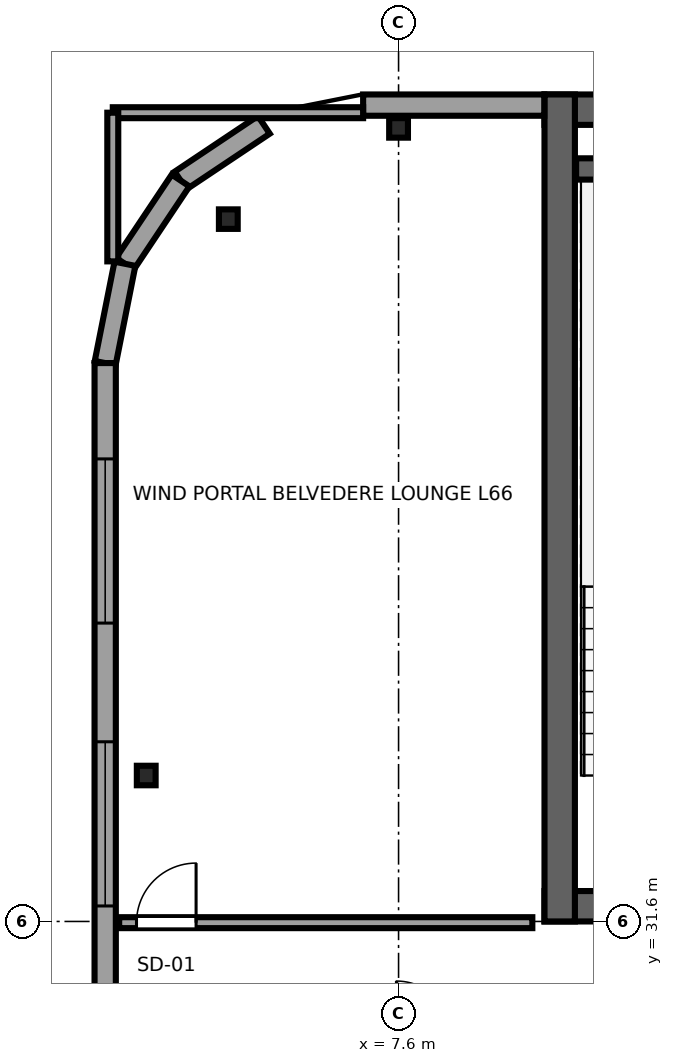
"""IFC4 building model, lengths in metres.
Left out: names, types, materials, properties, quantities, classifications, styles, units other than length and angle.
Written with IfcOpenShell. Run it as: python <this file> out.ifc"""

import sys

from ifc_helpers import new_model, si_unit, direction, frame, frame_2d, origin, origin_2d, place, context, subcontext, project, spatial, rectangle, i_section, extrude, source, transform, mapped, element, fill, save


model = new_model("IFC4")
c1 = context("Model", 3, precision=1e-05, world=origin(), true_north=direction((0.0, 1.0)))
c2 = subcontext(c1, "Body", "Model", "MODEL_VIEW")
j1 = project(units=[si_unit("LENGTHUNIT", "METRE"), si_unit("PLANEANGLEUNIT", "RADIAN")], contexts=[c1])
p1 = place(None, origin())
s1 = spatial("IfcSite", under=j1, at=p1, CompositionType="ELEMENT")
p2 = place(p1, origin())
s2 = spatial("IfcBuilding", under=s1, at=p2, CompositionType="ELEMENT")
p3 = place(p2, frame((0.0, 0.0, 248.75)))
s3 = spatial("IfcBuildingStorey", under=s2, at=p3, CompositionType="ELEMENT", Elevation=248.75)
p4 = place(p3, frame((10.0, 31.85, 0.0), z_axis=(0.0, 0.0, 1.0), x_axis=(1.0, 0.0, 0.0)))
e1 = element("IfcWall", 1, at=p4, inside=s3, PredefinedType="SHEAR", context=c2, shape_type="SweptSolid", body=[
    extrude(rectangle(XDim=26.0, YDim=0.5, at=frame_2d((13.0, 0.0))), origin(), (0.0, 0.0, 1.0), 3.55),
])
p5 = place(p4, frame((7.45, 0.0, 0.0), z_axis=(0.0, 0.0, 1.0), x_axis=(-1.0, 0.0, 0.0)))
e2 = element("IfcOpeningElement", 2, at=p5, cuts=e1, PredefinedType="OPENING", context=c2, shape_type="SweptSolid", body=[
    extrude(rectangle(XDim=1.5, YDim=2.04, at=frame_2d((0.75, 1.02))), frame((0.0, 0.26, 0.0), z_axis=(0.0, -1.0, 0.0), x_axis=(1.0, 0.0, 0.0)), (0.0, 0.0, 1.0), 0.52),
])
p6 = place(p4, frame((13.75, 0.0, 0.0), z_axis=(0.0, 0.0, 1.0), x_axis=(-1.0, 0.0, 0.0)))
e3 = element("IfcOpeningElement", 3, at=p6, cuts=e1, PredefinedType="OPENING", context=c2, shape_type="SweptSolid", body=[
    extrude(rectangle(XDim=1.5, YDim=2.04, at=frame_2d((0.75, 1.02))), frame((0.0, 0.26, 0.0), z_axis=(0.0, -1.0, 0.0), x_axis=(1.0, 0.0, 0.0)), (0.0, 0.0, 1.0), 0.52),
])
p7 = place(p4, frame((20.05, 0.0, 0.0), z_axis=(0.0, 0.0, 1.0), x_axis=(-1.0, 0.0, 0.0)))
e4 = element("IfcOpeningElement", 4, at=p7, cuts=e1, PredefinedType="OPENING", context=c2, shape_type="SweptSolid", body=[
    extrude(rectangle(XDim=1.5, YDim=2.04, at=frame_2d((0.75, 1.02))), frame((0.0, 0.26, 0.0), z_axis=(0.0, -1.0, 0.0), x_axis=(1.0, 0.0, 0.0)), (0.0, 0.0, 1.0), 0.52),
])
p8 = place(p3, frame((10.0, 44.95, 0.0), z_axis=(0.0, 0.0, 1.0), x_axis=(1.0, 0.0, 0.0)))
e5 = element("IfcWall", 5, at=p8, inside=s3, PredefinedType="SHEAR", context=c2, shape_type="SweptSolid", body=[
    extrude(rectangle(XDim=26.0, YDim=0.5, at=frame_2d((13.0, 0.0))), origin(), (0.0, 0.0, 1.0), 3.55),
])
p9 = place(p3, frame((10.25, 31.6, 0.0), z_axis=(0.0, 0.0, 1.0), x_axis=(0.0, 1.0, 0.0)))
e6 = element("IfcWall", 6, at=p9, inside=s3, PredefinedType="SHEAR", context=c2, shape_type="SweptSolid", body=[
    extrude(rectangle(XDim=13.6, YDim=0.5, at=frame_2d((6.8, 0.0))), origin(), (0.0, 0.0, 1.0), 3.55),
])
p10 = place(p3, frame((10.52, 43.975, 0.0), z_axis=(0.0, 0.0, 1.0), x_axis=(1.0, 0.0, 0.0)))
e7 = element("IfcWall", 7, at=p10, inside=s3, PredefinedType="SHEAR", context=c2, shape_type="SweptSolid", body=[
    extrude(rectangle(XDim=3.6, YDim=0.35, at=frame_2d((1.8, 0.0))), origin(), (0.0, 0.0, 1.0), 3.55),
])
m1 = source(origin(), c2, "Body", "SweptSolid", [
    extrude(i_section(OverallWidth=0.309, OverallDepth=0.321, WebThickness=0.014, FlangeThickness=0.022, FilletRadius=0.017, at=origin_2d()), origin(), (0.0, 0.0, 1.0), 3.55),
])
for number, where, z_axis, x_axis in (
    (8, (4.8, 43.15, 0.0), (0.0, 0.0, 1.0), (1.0, 0.0, 0.0)),
    (9, (7.6, 44.65, 0.0), (0.0, 0.0, 1.0), (1.0, 0.0, 0.0)),
    (10, (3.45, 34.0, 0.0), (0.0, 0.0, 1.0), (1.0, 0.0, 0.0)),
):
    element("IfcColumn", number, at=place(p3, frame(where, z_axis=z_axis, x_axis=x_axis)), inside=s3, PredefinedType="COLUMN", context=c2, shape_type="MappedRepresentation", body=[
        mapped(m1, transform((0.0, 0.0, 0.0), x_axis=(1.0, 0.0, 0.0), y_axis=(0.0, 1.0, 0.0), z_axis=(0.0, 0.0, 1.0), scale=1.0)),
    ])
p11 = place(p3, frame((9.996, 45.025, 0.0), z_axis=(0.0, 0.0, 1.0), x_axis=(-1.0, 0.0, 0.0)))
e11 = element("IfcWall", 11, at=p11, inside=s3, PredefinedType="SOLIDWALL", context=c2, shape_type="SweptSolid", body=[
    extrude(rectangle(XDim=2.979, YDim=0.35, at=frame_2d((1.49, 0.0))), origin(), (0.0, 0.0, 1.0), 2.16),
])
for number, where, z_axis, x_axis in (
    (12, (5.385, 44.7, 0.0), (0.0, 0.0, 1.0), (-0.832, -0.556, 0.0)),
    (13, (4.015, 43.785, 0.0), (0.0, 0.0, 1.0), (-0.556, -0.831, 0.0)),
):
    element("IfcWall", number, at=place(p3, frame(where, z_axis=z_axis, x_axis=x_axis)), inside=s3, PredefinedType="SOLIDWALL", context=c2, shape_type="SweptSolid", body=[
        extrude(rectangle(XDim=1.647, YDim=0.35, at=frame_2d((0.824, 0.0))), origin(), (0.0, 0.0, 1.0), 2.9),
    ])
p12 = place(p3, frame((3.1, 42.416, 0.0), z_axis=(0.0, 0.0, 1.0), x_axis=(-0.195044345786, -0.980794424524, 0.0)))
e14 = element("IfcWall", 14, at=p12, inside=s3, PredefinedType="SOLIDWALL", context=c2, shape_type="SweptSolid", body=[
    extrude(rectangle(XDim=1.665, YDim=0.35, at=frame_2d((0.833, 0.0))), origin(), (0.0, 0.0, 1.0), 3.37),
])
p13 = place(p3, frame((2.775, 40.783, 0.0), z_axis=(0.0, 0.0, 1.0), x_axis=(0.0, -1.0, 0.0)))
e15 = element("IfcWall", 15, at=p13, inside=s3, PredefinedType="SOLIDWALL", context=c2, shape_type="SweptSolid", body=[
    extrude(rectangle(XDim=33.766, YDim=0.35, at=frame_2d((16.883, 0.0))), origin(), (0.0, 0.0, 1.0), 3.37),
])
p14 = place(p13, frame((1.576, 0.0, 0.68)))
e16 = element("IfcOpeningElement", 16, at=p14, cuts=e15, PredefinedType="OPENING", context=c2, shape_type="SweptSolid", body=[
    extrude(rectangle(XDim=2.7, YDim=1.95, at=frame_2d((1.35, 0.975))), frame((0.0, 0.185, 0.0), z_axis=(0.0, -1.0, 0.0), x_axis=(1.0, 0.0, 0.0)), (0.0, 0.0, 1.0), 0.37),
])
p15 = place(p13, frame((6.228, 0.0, 0.68)))
e17 = element("IfcOpeningElement", 17, at=p15, cuts=e15, PredefinedType="OPENING", context=c2, shape_type="SweptSolid", body=[
    extrude(rectangle(XDim=2.7, YDim=1.95, at=frame_2d((1.35, 0.975))), frame((0.0, 0.185, 0.0), z_axis=(0.0, -1.0, 0.0), x_axis=(1.0, 0.0, 0.0)), (0.0, 0.0, 1.0), 0.37),
])
p16 = place(p13, frame((11.431, 0.0, 0.68)))
e18 = element("IfcOpeningElement", 18, at=p16, cuts=e15, PredefinedType="OPENING", context=c2, shape_type="SweptSolid", body=[
    extrude(rectangle(XDim=2.7, YDim=1.95, at=frame_2d((1.35, 0.975))), frame((0.0, 0.185, 0.0), z_axis=(0.0, -1.0, 0.0), x_axis=(1.0, 0.0, 0.0)), (0.0, 0.0, 1.0), 0.37),
])
p17 = place(p13, frame((15.533, 0.0, 0.68)))
e19 = element("IfcOpeningElement", 19, at=p17, cuts=e15, PredefinedType="OPENING", context=c2, shape_type="SweptSolid", body=[
    extrude(rectangle(XDim=2.7, YDim=1.95, at=frame_2d((1.35, 0.975))), frame((0.0, 0.185, 0.0), z_axis=(0.0, -1.0, 0.0), x_axis=(1.0, 0.0, 0.0)), (0.0, 0.0, 1.0), 0.37),
])
p18 = place(p13, frame((20.185, 0.0, 0.68)))
e20 = element("IfcOpeningElement", 20, at=p18, cuts=e15, PredefinedType="OPENING", context=c2, shape_type="SweptSolid", body=[
    extrude(rectangle(XDim=2.7, YDim=1.95, at=frame_2d((1.35, 0.975))), frame((0.0, 0.185, 0.0), z_axis=(0.0, -1.0, 0.0), x_axis=(1.0, 0.0, 0.0)), (0.0, 0.0, 1.0), 0.37),
])
p19 = place(p13, frame((24.837, 0.0, 0.68)))
e21 = element("IfcOpeningElement", 21, at=p19, cuts=e15, PredefinedType="OPENING", context=c2, shape_type="SweptSolid", body=[
    extrude(rectangle(XDim=2.7, YDim=1.95, at=frame_2d((1.35, 0.975))), frame((0.0, 0.185, 0.0), z_axis=(0.0, -1.0, 0.0), x_axis=(1.0, 0.0, 0.0)), (0.0, 0.0, 1.0), 0.37),
])
p20 = place(p13, frame((29.489, 0.0, 0.68)))
e22 = element("IfcOpeningElement", 22, at=p20, cuts=e15, PredefinedType="OPENING", context=c2, shape_type="SweptSolid", body=[
    extrude(rectangle(XDim=2.7, YDim=1.95, at=frame_2d((1.35, 0.975))), frame((0.0, 0.185, 0.0), z_axis=(0.0, -1.0, 0.0), x_axis=(1.0, 0.0, 0.0)), (0.0, 0.0, 1.0), 0.37),
])
p21 = place(p3, frame((3.005, 31.58, 0.0), z_axis=(0.0, 0.0, 1.0), x_axis=(1.0, 0.0, 0.0)))
e23 = element("IfcWall", 23, at=p21, inside=s3, PredefinedType="PARTITIONING", context=c2, shape_type="SweptSolid", body=[
    extrude(rectangle(XDim=6.795, YDim=0.18, at=frame_2d((3.397, 0.0))), origin(), (0.0, 0.0, 1.0), 3.37),
])
p22 = place(p21, frame((0.285, 0.0, 0.0)))
e24 = element("IfcOpeningElement", 24, at=p22, cuts=e23, PredefinedType="OPENING", context=c2, shape_type="SweptSolid", body=[
    extrude(rectangle(XDim=0.98, YDim=2.12, at=frame_2d((0.49, 1.06))), frame((0.0, 0.1, 0.0), z_axis=(0.0, -1.0, 0.0), x_axis=(1.0, 0.0, 0.0)), (0.0, 0.0, 1.0), 0.2),
])
p23 = place(p3, frame((2.9, 44.9, 0.0), z_axis=(0.0, 0.0, 1.0), x_axis=(1.0, 0.0, 0.0)))
e25 = element("IfcWall", 25, at=p23, inside=s3, PredefinedType="PARTITIONING", context=c2, shape_type="SweptSolid", body=[
    extrude(rectangle(XDim=4.117, YDim=0.18, at=frame_2d((2.059, 0.0))), origin(), (0.0, 0.0, 1.0), 3.37),
])
p24 = place(p3, frame((2.9, 42.455, 0.0), z_axis=(0.0, 0.0, 1.0), x_axis=(0.0, 1.0, 0.0)))
e26 = element("IfcWall", 26, at=p24, inside=s3, PredefinedType="PARTITIONING", context=c2, shape_type="SweptSolid", body=[
    extrude(rectangle(XDim=2.445, YDim=0.18, at=frame_2d((1.222, 0.0))), origin(), (0.0, 0.0, 1.0), 3.37),
])
m2 = source(origin(), c2, "Body", "SweptSolid", [
    extrude(rectangle(XDim=2.7, YDim=1.95, at=frame_2d((1.35, 0.975))), frame((0.0, 0.09, 0.0), z_axis=(0.0, -1.0, 0.0), x_axis=(1.0, 0.0, 0.0)), (0.0, 0.0, 1.0), 0.06),
])
p25 = place(p14, origin())
e27 = element("IfcWindow", 27, at=p25, inside=s3, PartitioningType="TRIPLE_PANEL_HORIZONTAL", PredefinedType="WINDOW", context=c2, shape_type="MappedRepresentation", body=[
    mapped(m2, transform((0.0, 0.0, 0.0), x_axis=(1.0, 0.0, 0.0), y_axis=(0.0, 1.0, 0.0), z_axis=(0.0, 0.0, 1.0), scale=1.0)),
])
fill(e16, e27)
p26 = place(p15, origin())
e28 = element("IfcWindow", 28, at=p26, inside=s3, PartitioningType="TRIPLE_PANEL_HORIZONTAL", PredefinedType="WINDOW", context=c2, shape_type="MappedRepresentation", body=[
    mapped(m2, transform((0.0, 0.0, 0.0), x_axis=(1.0, 0.0, 0.0), y_axis=(0.0, 1.0, 0.0), z_axis=(0.0, 0.0, 1.0), scale=1.0)),
])
fill(e17, e28)
m3 = source(origin(), c2, "Body", "SweptSolid", [
    extrude(rectangle(XDim=0.98, YDim=2.12, at=frame_2d((0.49, 1.06))), frame((0.0, 0.025, 0.0), z_axis=(0.0, -1.0, 0.0), x_axis=(1.0, 0.0, 0.0)), (0.0, 0.0, 1.0), 0.05),
])
p27 = place(p22, origin())
e29 = element("IfcDoor", 29, at=p27, inside=s3, OperationType="SINGLE_SWING_RIGHT", PredefinedType="DOOR", context=c2, shape_type="MappedRepresentation", body=[
    mapped(m3, transform((0.0, 0.0, 0.0), x_axis=(1.0, 0.0, 0.0), y_axis=(0.0, 1.0, 0.0), z_axis=(0.0, 0.0, 1.0), scale=1.0)),
])
fill(e24, e29)
save(model, sys.argv[1])
